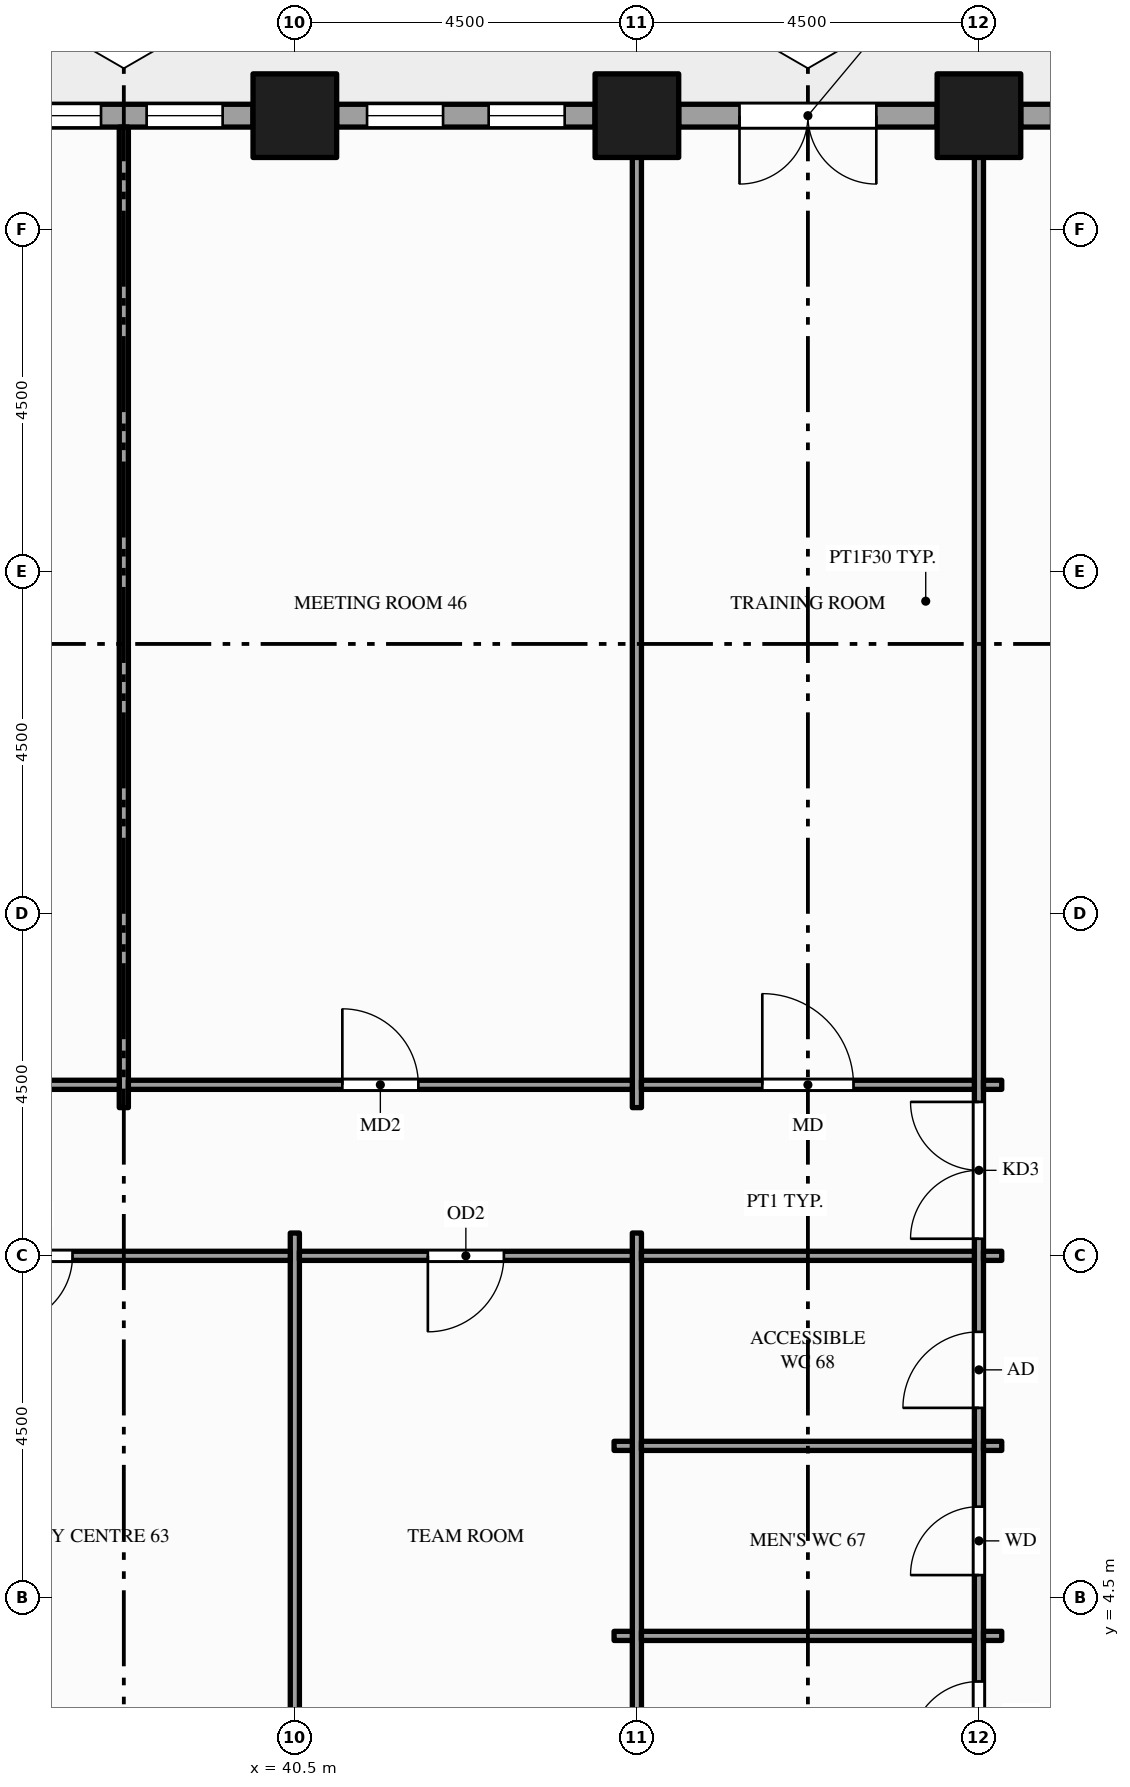
"""IFC4 building model, lengths in metres.
Left out: names, types, materials, properties, quantities, classifications, styles, units other than length and angle.
Written with IfcOpenShell. Run it as: python <this file> out.ifc"""

import sys

from ifc_helpers import new_model, si_unit, direction, frame, frame_2d, origin, origin_2d, place, context, subcontext, project, spatial, rectangle, hollow_rectangle, extrude, element, fill, save


model = new_model("IFC4")
c1 = context("Model", 3, precision=1e-05, world=origin(), true_north=direction((0.0, 1.0)))
c2 = subcontext(c1, "Body", "Model", "MODEL_VIEW")
j1 = project(units=[si_unit("LENGTHUNIT", "METRE"), si_unit("PLANEANGLEUNIT", "RADIAN")], contexts=[c1])
p1 = place(None, origin())
s1 = spatial("IfcSite", under=j1, at=p1, CompositionType="ELEMENT")
p2 = place(p1, origin())
s2 = spatial("IfcBuilding", under=s1, at=p2, CompositionType="ELEMENT")
p3 = place(p2, frame((0.0, 0.0, 29.0)))
s3 = spatial("IfcBuildingStorey", under=s2, at=p3, CompositionType="ELEMENT", Elevation=29.0)
for number, where, z_axis, x_axis in (
    (1, (40.5, 24.0, -0.3), (0.0, 0.0, 1.0), (1.0, 0.0, 0.0)),
    (2, (45.0, 24.0, -0.3), (0.0, 0.0, 1.0), (1.0, 0.0, 0.0)),
    (3, (49.5, 24.0, -0.3), (0.0, 0.0, 1.0), (1.0, 0.0, 0.0)),
):
    element("IfcColumn", number, at=place(p3, frame(where, z_axis=z_axis, x_axis=x_axis)), inside=s3, PredefinedType="COLUMN", context=c2, shape_type="SweptSolid", body=[
        extrude(hollow_rectangle(XDim=1.1, YDim=1.1, WallThickness=0.06, at=origin_2d()), origin(), (0.0, 0.0, 1.0), 4.15),
    ])
p4 = place(p3, frame((53.45, 24.0, 0.0), z_axis=(0.0, 0.0, 1.0), x_axis=(-1.0, 0.0, 0.0)))
e4 = element("IfcWall", 4, at=p4, inside=s3, PredefinedType="STANDARD", context=c2, shape_type="SweptSolid", body=[
    extrude(rectangle(XDim=3.4, YDim=0.3, at=frame_2d((1.7, 0.0))), origin(), (0.0, 0.0, 1.0), 3.144),
])
p5 = place(p4, frame((0.4, 0.0, 0.9)))
e5 = element("IfcOpeningElement", 5, at=p5, cuts=e4, PredefinedType="OPENING", context=c2, shape_type="SweptSolid", body=[
    extrude(rectangle(XDim=1.0, YDim=2.0, at=frame_2d((0.5, 1.0))), frame((0.0, 0.16, 0.0), z_axis=(0.0, -1.0, 0.0), x_axis=(1.0, 0.0, 0.0)), (0.0, 0.0, 1.0), 0.32),
])
p6 = place(p4, frame((2.0, 0.0, 0.9)))
e6 = element("IfcOpeningElement", 6, at=p6, cuts=e4, PredefinedType="OPENING", context=c2, shape_type="SweptSolid", body=[
    extrude(rectangle(XDim=1.0, YDim=2.0, at=frame_2d((0.5, 1.0))), frame((0.0, 0.16, 0.0), z_axis=(0.0, -1.0, 0.0), x_axis=(1.0, 0.0, 0.0)), (0.0, 0.0, 1.0), 0.32),
])
p7 = place(p3, frame((48.95, 24.0, 0.0), z_axis=(0.0, 0.0, 1.0), x_axis=(-1.0, 0.0, 0.0)))
e7 = element("IfcWall", 7, at=p7, inside=s3, PredefinedType="STANDARD", context=c2, shape_type="SweptSolid", body=[
    extrude(rectangle(XDim=3.4, YDim=0.3, at=frame_2d((1.7, 0.0))), origin(), (0.0, 0.0, 1.0), 3.144),
])
p8 = place(p7, frame((0.8, 0.0, 0.0)))
e8 = element("IfcOpeningElement", 8, at=p8, cuts=e7, PredefinedType="OPENING", context=c2, shape_type="SweptSolid", body=[
    extrude(rectangle(XDim=1.8, YDim=2.4, at=frame_2d((0.9, 1.2))), frame((0.0, 0.16, 0.0), z_axis=(0.0, -1.0, 0.0), x_axis=(1.0, 0.0, 0.0)), (0.0, 0.0, 1.0), 0.32),
])
p9 = place(p3, frame((44.45, 24.0, 0.0), z_axis=(0.0, 0.0, 1.0), x_axis=(-1.0, 0.0, 0.0)))
e9 = element("IfcWall", 9, at=p9, inside=s3, PredefinedType="STANDARD", context=c2, shape_type="SweptSolid", body=[
    extrude(rectangle(XDim=3.4, YDim=0.3, at=frame_2d((1.7, 0.0))), origin(), (0.0, 0.0, 1.0), 3.144),
])
p10 = place(p9, frame((0.4, 0.0, 0.9)))
e10 = element("IfcOpeningElement", 10, at=p10, cuts=e9, PredefinedType="OPENING", context=c2, shape_type="SweptSolid", body=[
    extrude(rectangle(XDim=1.0, YDim=2.0, at=frame_2d((0.5, 1.0))), frame((0.0, 0.16, 0.0), z_axis=(0.0, -1.0, 0.0), x_axis=(1.0, 0.0, 0.0)), (0.0, 0.0, 1.0), 0.32),
])
p11 = place(p9, frame((2.0, 0.0, 0.9)))
e11 = element("IfcOpeningElement", 11, at=p11, cuts=e9, PredefinedType="OPENING", context=c2, shape_type="SweptSolid", body=[
    extrude(rectangle(XDim=1.0, YDim=2.0, at=frame_2d((0.5, 1.0))), frame((0.0, 0.16, 0.0), z_axis=(0.0, -1.0, 0.0), x_axis=(1.0, 0.0, 0.0)), (0.0, 0.0, 1.0), 0.32),
])
p12 = place(p3, frame((39.95, 24.0, 0.0), z_axis=(0.0, 0.0, 1.0), x_axis=(-1.0, 0.0, 0.0)))
e12 = element("IfcWall", 12, at=p12, inside=s3, PredefinedType="STANDARD", context=c2, shape_type="SweptSolid", body=[
    extrude(rectangle(XDim=3.4, YDim=0.3, at=frame_2d((1.7, 0.0))), origin(), (0.0, 0.0, 1.0), 3.144),
])
p13 = place(p12, frame((0.4, 0.0, 0.9)))
e13 = element("IfcOpeningElement", 13, at=p13, cuts=e12, PredefinedType="OPENING", context=c2, shape_type="SweptSolid", body=[
    extrude(rectangle(XDim=1.0, YDim=2.0, at=frame_2d((0.5, 1.0))), frame((0.0, 0.16, 0.0), z_axis=(0.0, -1.0, 0.0), x_axis=(1.0, 0.0, 0.0)), (0.0, 0.0, 1.0), 0.32),
])
p14 = place(p12, frame((2.0, 0.0, 0.9)))
e14 = element("IfcOpeningElement", 14, at=p14, cuts=e12, PredefinedType="OPENING", context=c2, shape_type="SweptSolid", body=[
    extrude(rectangle(XDim=1.0, YDim=2.0, at=frame_2d((0.5, 1.0))), frame((0.0, 0.16, 0.0), z_axis=(0.0, -1.0, 0.0), x_axis=(1.0, 0.0, 0.0)), (0.0, 0.0, 1.0), 0.32),
])
p15 = place(p3, frame((38.25, 10.95, 0.0), z_axis=(0.0, 0.0, 1.0), x_axis=(0.0, 1.0, 0.0)))
e15 = element("IfcWall", 15, at=p15, inside=s3, PredefinedType="PARTITIONING", context=c2, shape_type="SweptSolid", body=[
    extrude(rectangle(XDim=12.9, YDim=0.12, at=frame_2d((6.45, 0.0))), origin(), (0.0, 0.0, 1.0), 2.938),
])
for number, where, z_axis, x_axis in (
    (16, (40.5, 1.65, 0.0), (0.0, 0.0, 1.0), (0.0, 1.0, 0.0)),
    (17, (45.0, 1.65, 0.0), (0.0, 0.0, 1.0), (0.0, 1.0, 0.0)),
):
    element("IfcWall", number, at=place(p3, frame(where, z_axis=z_axis, x_axis=x_axis)), inside=s3, PredefinedType="PARTITIONING", context=c2, shape_type="SweptSolid", body=[
        extrude(rectangle(XDim=7.65, YDim=0.12, at=frame_2d((3.825, 0.0))), origin(), (0.0, 0.0, 1.0), 2.938),
    ])
p16 = place(p3, frame((45.0, 10.95, 0.0), z_axis=(0.0, 0.0, 1.0), x_axis=(0.0, 1.0, 0.0)))
e18 = element("IfcWall", 18, at=p16, inside=s3, PredefinedType="PARTITIONING", context=c2, shape_type="SweptSolid", body=[
    extrude(rectangle(XDim=12.9, YDim=0.12, at=frame_2d((6.45, 0.0))), origin(), (0.0, 0.0, 1.0), 2.938),
])
p17 = place(p3, frame((49.5, 1.65, 0.0), z_axis=(0.0, 0.0, 1.0), x_axis=(0.0, 1.0, 0.0)))
e19 = element("IfcWall", 19, at=p17, inside=s3, PredefinedType="PARTITIONING", context=c2, shape_type="SweptSolid", body=[
    extrude(rectangle(XDim=22.2, YDim=0.12, at=frame_2d((11.1, 0.0))), origin(), (0.0, 0.0, 1.0), 2.938),
])
p18 = place(p17, frame((7.575, 0.0, 0.0)))
e20 = element("IfcOpeningElement", 20, at=p18, cuts=e19, PredefinedType="OPENING", context=c2, shape_type="SweptSolid", body=[
    extrude(rectangle(XDim=1.8, YDim=2.1, at=frame_2d((0.9, 1.05))), frame((0.0, 0.07, 0.0), z_axis=(0.0, -1.0, 0.0), x_axis=(1.0, 0.0, 0.0)), (0.0, 0.0, 1.0), 0.14),
])
p19 = place(p17, frame((0.85, 0.0, 0.0)))
e21 = element("IfcOpeningElement", 21, at=p19, cuts=e19, PredefinedType="OPENING", context=c2, shape_type="SweptSolid", body=[
    extrude(rectangle(XDim=0.9, YDim=2.1, at=frame_2d((0.45, 1.05))), frame((0.0, 0.07, 0.0), z_axis=(0.0, -1.0, 0.0), x_axis=(1.0, 0.0, 0.0)), (0.0, 0.0, 1.0), 0.14),
])
p20 = place(p17, frame((3.15, 0.0, 0.0)))
e22 = element("IfcOpeningElement", 22, at=p20, cuts=e19, PredefinedType="OPENING", context=c2, shape_type="SweptSolid", body=[
    extrude(rectangle(XDim=0.9, YDim=2.1, at=frame_2d((0.45, 1.05))), frame((0.0, 0.07, 0.0), z_axis=(0.0, -1.0, 0.0), x_axis=(1.0, 0.0, 0.0)), (0.0, 0.0, 1.0), 0.14),
])
p21 = place(p17, frame((5.35, 0.0, 0.0)))
e23 = element("IfcOpeningElement", 23, at=p21, cuts=e19, PredefinedType="OPENING", context=c2, shape_type="SweptSolid", body=[
    extrude(rectangle(XDim=1.0, YDim=2.1, at=frame_2d((0.5, 1.05))), frame((0.0, 0.07, 0.0), z_axis=(0.0, -1.0, 0.0), x_axis=(1.0, 0.0, 0.0)), (0.0, 0.0, 1.0), 0.14),
])
p22 = place(p3, frame((44.7, 4.0, 0.0), z_axis=(0.0, 0.0, 1.0), x_axis=(1.0, 0.0, 0.0)))
e24 = element("IfcWall", 24, at=p22, inside=s3, PredefinedType="PARTITIONING", context=c2, shape_type="SweptSolid", body=[
    extrude(rectangle(XDim=0.24, YDim=0.12, at=frame_2d((0.12, 0.0))), origin(), (0.0, 0.0, 1.0), 2.938),
])
p23 = place(p3, frame((45.06, 4.0, 0.0), z_axis=(0.0, 0.0, 1.0), x_axis=(1.0, 0.0, 0.0)))
e25 = element("IfcWall", 25, at=p23, inside=s3, PredefinedType="PARTITIONING", context=c2, shape_type="SweptSolid", body=[
    extrude(rectangle(XDim=4.38, YDim=0.12, at=frame_2d((2.19, 0.0))), origin(), (0.0, 0.0, 1.0), 2.938),
])
for number, where, z_axis, x_axis in (
    (26, (49.56, 4.0, 0.0), (0.0, 0.0, 1.0), (1.0, 0.0, 0.0)),
    (27, (44.7, 6.5, 0.0), (0.0, 0.0, 1.0), (1.0, 0.0, 0.0)),
):
    element("IfcWall", number, at=place(p3, frame(where, z_axis=z_axis, x_axis=x_axis)), inside=s3, PredefinedType="PARTITIONING", context=c2, shape_type="SweptSolid", body=[
        extrude(rectangle(XDim=0.24, YDim=0.12, at=frame_2d((0.12, 0.0))), origin(), (0.0, 0.0, 1.0), 2.938),
    ])
p24 = place(p3, frame((45.06, 6.5, 0.0), z_axis=(0.0, 0.0, 1.0), x_axis=(1.0, 0.0, 0.0)))
e28 = element("IfcWall", 28, at=p24, inside=s3, PredefinedType="PARTITIONING", context=c2, shape_type="SweptSolid", body=[
    extrude(rectangle(XDim=4.38, YDim=0.12, at=frame_2d((2.19, 0.0))), origin(), (0.0, 0.0, 1.0), 2.938),
])
p25 = place(p3, frame((49.56, 6.5, 0.0), z_axis=(0.0, 0.0, 1.0), x_axis=(1.0, 0.0, 0.0)))
e29 = element("IfcWall", 29, at=p25, inside=s3, PredefinedType="PARTITIONING", context=c2, shape_type="SweptSolid", body=[
    extrude(rectangle(XDim=0.24, YDim=0.12, at=frame_2d((0.12, 0.0))), origin(), (0.0, 0.0, 1.0), 2.938),
])
p26 = place(p3, frame((33.81, 9.0, 0.0), z_axis=(0.0, 0.0, 1.0), x_axis=(1.0, 0.0, 0.0)))
e30 = element("IfcWall", 30, at=p26, inside=s3, PredefinedType="PARTITIONING", context=c2, shape_type="SweptSolid", body=[
    extrude(rectangle(XDim=6.63, YDim=0.12, at=frame_2d((3.315, 0.0))), origin(), (0.0, 0.0, 1.0), 2.938),
])
p27 = place(p26, frame((2.865, 0.0, 0.0)))
e31 = element("IfcOpeningElement", 31, at=p27, cuts=e30, PredefinedType="OPENING", context=c2, shape_type="SweptSolid", body=[
    extrude(rectangle(XDim=0.9, YDim=2.1, at=frame_2d((0.45, 1.05))), frame((0.0, 0.07, 0.0), z_axis=(0.0, -1.0, 0.0), x_axis=(1.0, 0.0, 0.0)), (0.0, 0.0, 1.0), 0.14),
])
p28 = place(p3, frame((40.56, 9.0, 0.0), z_axis=(0.0, 0.0, 1.0), x_axis=(1.0, 0.0, 0.0)))
e32 = element("IfcWall", 32, at=p28, inside=s3, PredefinedType="PARTITIONING", context=c2, shape_type="SweptSolid", body=[
    extrude(rectangle(XDim=4.38, YDim=0.12, at=frame_2d((2.19, 0.0))), origin(), (0.0, 0.0, 1.0), 2.938),
])
p29 = place(p28, frame((1.69, 0.0, 0.0)))
e33 = element("IfcOpeningElement", 33, at=p29, cuts=e32, PredefinedType="OPENING", context=c2, shape_type="SweptSolid", body=[
    extrude(rectangle(XDim=1.0, YDim=2.1, at=frame_2d((0.5, 1.05))), frame((0.0, 0.07, 0.0), z_axis=(0.0, -1.0, 0.0), x_axis=(1.0, 0.0, 0.0)), (0.0, 0.0, 1.0), 0.14),
])
p30 = place(p3, frame((45.06, 9.0, 0.0), z_axis=(0.0, 0.0, 1.0), x_axis=(1.0, 0.0, 0.0)))
e34 = element("IfcWall", 34, at=p30, inside=s3, PredefinedType="PARTITIONING", context=c2, shape_type="SweptSolid", body=[
    extrude(rectangle(XDim=4.38, YDim=0.12, at=frame_2d((2.19, 0.0))), origin(), (0.0, 0.0, 1.0), 2.938),
])
p31 = place(p3, frame((49.56, 9.0, 0.0), z_axis=(0.0, 0.0, 1.0), x_axis=(1.0, 0.0, 0.0)))
e35 = element("IfcWall", 35, at=p31, inside=s3, PredefinedType="PARTITIONING", context=c2, shape_type="SweptSolid", body=[
    extrude(rectangle(XDim=0.24, YDim=0.12, at=frame_2d((0.12, 0.0))), origin(), (0.0, 0.0, 1.0), 2.938),
])
p32 = place(p3, frame((27.06, 11.25, 0.0), z_axis=(0.0, 0.0, 1.0), x_axis=(1.0, 0.0, 0.0)))
e36 = element("IfcWall", 36, at=p32, inside=s3, PredefinedType="PARTITIONING", context=c2, shape_type="SweptSolid", body=[
    extrude(rectangle(XDim=11.13, YDim=0.12, at=frame_2d((5.565, 0.0))), origin(), (0.0, 0.0, 1.0), 2.938),
])
p33 = place(p32, frame((4.665, 0.0, 0.0)))
e37 = element("IfcOpeningElement", 37, at=p33, cuts=e36, PredefinedType="OPENING", context=c2, shape_type="SweptSolid", body=[
    extrude(rectangle(XDim=1.8, YDim=2.1, at=frame_2d((0.9, 1.05))), frame((0.0, 0.07, 0.0), z_axis=(0.0, -1.0, 0.0), x_axis=(1.0, 0.0, 0.0)), (0.0, 0.0, 1.0), 0.14),
])
p34 = place(p3, frame((38.31, 11.25, 0.0), z_axis=(0.0, 0.0, 1.0), x_axis=(1.0, 0.0, 0.0)))
e38 = element("IfcWall", 38, at=p34, inside=s3, PredefinedType="PARTITIONING", context=c2, shape_type="SweptSolid", body=[
    extrude(rectangle(XDim=6.63, YDim=0.12, at=frame_2d((3.315, 0.0))), origin(), (0.0, 0.0, 1.0), 2.938),
])
p35 = place(p34, frame((2.815, 0.0, 0.0)))
e39 = element("IfcOpeningElement", 39, at=p35, cuts=e38, PredefinedType="OPENING", context=c2, shape_type="SweptSolid", body=[
    extrude(rectangle(XDim=1.0, YDim=2.1, at=frame_2d((0.5, 1.05))), frame((0.0, 0.07, 0.0), z_axis=(0.0, -1.0, 0.0), x_axis=(1.0, 0.0, 0.0)), (0.0, 0.0, 1.0), 0.14),
])
p36 = place(p3, frame((45.06, 11.25, 0.0), z_axis=(0.0, 0.0, 1.0), x_axis=(1.0, 0.0, 0.0)))
e40 = element("IfcWall", 40, at=p36, inside=s3, PredefinedType="PARTITIONING", context=c2, shape_type="SweptSolid", body=[
    extrude(rectangle(XDim=4.38, YDim=0.12, at=frame_2d((2.19, 0.0))), origin(), (0.0, 0.0, 1.0), 2.938),
])
p37 = place(p36, frame((1.59, 0.0, 0.0)))
e41 = element("IfcOpeningElement", 41, at=p37, cuts=e40, PredefinedType="OPENING", context=c2, shape_type="SweptSolid", body=[
    extrude(rectangle(XDim=1.2, YDim=2.1, at=frame_2d((0.6, 1.05))), frame((0.0, 0.07, 0.0), z_axis=(0.0, -1.0, 0.0), x_axis=(1.0, 0.0, 0.0)), (0.0, 0.0, 1.0), 0.14),
])
p38 = place(p3, frame((49.56, 11.25, 0.0), z_axis=(0.0, 0.0, 1.0), x_axis=(1.0, 0.0, 0.0)))
e42 = element("IfcWall", 42, at=p38, inside=s3, PredefinedType="PARTITIONING", context=c2, shape_type="SweptSolid", body=[
    extrude(rectangle(XDim=0.24, YDim=0.12, at=frame_2d((0.12, 0.0))), origin(), (0.0, 0.0, 1.0), 2.938),
])
p39 = place(p8, origin())
e43 = element("IfcDoor", 43, at=p39, inside=s3, OperationType="DOUBLE_DOOR_SINGLE_SWING", PredefinedType="DOOR", context=c2, shape_type="SweptSolid", body=[
    extrude(rectangle(XDim=1.8, YDim=2.4, at=frame_2d((0.9, 1.2))), frame((0.0, 0.025, 0.0), z_axis=(0.0, -1.0, 0.0), x_axis=(1.0, 0.0, 0.0)), (0.0, 0.0, 1.0), 0.05),
])
fill(e8, e43)
p40 = place(p10, origin())
e44 = element("IfcWindow", 44, at=p40, inside=s3, PartitioningType="SINGLE_PANEL", PredefinedType="WINDOW", context=c2, shape_type="SweptSolid", body=[
    extrude(rectangle(XDim=1.0, YDim=2.0, at=frame_2d((0.5, 1.0))), frame((0.0, 0.03, 0.0), z_axis=(0.0, -1.0, 0.0), x_axis=(1.0, 0.0, 0.0)), (0.0, 0.0, 1.0), 0.06),
])
fill(e10, e44)
p41 = place(p11, origin())
e45 = element("IfcWindow", 45, at=p41, inside=s3, PartitioningType="SINGLE_PANEL", PredefinedType="WINDOW", context=c2, shape_type="SweptSolid", body=[
    extrude(rectangle(XDim=1.0, YDim=2.0, at=frame_2d((0.5, 1.0))), frame((0.0, 0.03, 0.0), z_axis=(0.0, -1.0, 0.0), x_axis=(1.0, 0.0, 0.0)), (0.0, 0.0, 1.0), 0.06),
])
fill(e11, e45)
p42 = place(p13, origin())
e46 = element("IfcWindow", 46, at=p42, inside=s3, PartitioningType="SINGLE_PANEL", PredefinedType="WINDOW", context=c2, shape_type="SweptSolid", body=[
    extrude(rectangle(XDim=1.0, YDim=2.0, at=frame_2d((0.5, 1.0))), frame((0.0, 0.03, 0.0), z_axis=(0.0, -1.0, 0.0), x_axis=(1.0, 0.0, 0.0)), (0.0, 0.0, 1.0), 0.06),
])
fill(e13, e46)
p43 = place(p14, origin())
e47 = element("IfcWindow", 47, at=p43, inside=s3, PartitioningType="SINGLE_PANEL", PredefinedType="WINDOW", context=c2, shape_type="SweptSolid", body=[
    extrude(rectangle(XDim=1.0, YDim=2.0, at=frame_2d((0.5, 1.0))), frame((0.0, 0.03, 0.0), z_axis=(0.0, -1.0, 0.0), x_axis=(1.0, 0.0, 0.0)), (0.0, 0.0, 1.0), 0.06),
])
fill(e14, e47)
p44 = place(p18, origin())
e48 = element("IfcDoor", 48, at=p44, inside=s3, OperationType="DOUBLE_DOOR_SINGLE_SWING", PredefinedType="DOOR", context=c2, shape_type="SweptSolid", body=[
    extrude(rectangle(XDim=1.8, YDim=2.1, at=frame_2d((0.9, 1.05))), frame((0.0, 0.025, 0.0), z_axis=(0.0, -1.0, 0.0), x_axis=(1.0, 0.0, 0.0)), (0.0, 0.0, 1.0), 0.05),
])
fill(e20, e48)
p45 = place(p27, origin())
e49 = element("IfcDoor", 49, at=p45, inside=s3, OperationType="SINGLE_SWING_LEFT", PredefinedType="DOOR", context=c2, shape_type="SweptSolid", body=[
    extrude(rectangle(XDim=0.9, YDim=2.1, at=frame_2d((0.45, 1.05))), frame((0.0, 0.025, 0.0), z_axis=(0.0, -1.0, 0.0), x_axis=(1.0, 0.0, 0.0)), (0.0, 0.0, 1.0), 0.05),
])
fill(e31, e49)
p46 = place(p29, origin())
e50 = element("IfcDoor", 50, at=p46, inside=s3, OperationType="SINGLE_SWING_LEFT", PredefinedType="DOOR", context=c2, shape_type="SweptSolid", body=[
    extrude(rectangle(XDim=1.0, YDim=2.1, at=frame_2d((0.5, 1.05))), frame((0.0, 0.025, 0.0), z_axis=(0.0, -1.0, 0.0), x_axis=(1.0, 0.0, 0.0)), (0.0, 0.0, 1.0), 0.05),
])
fill(e33, e50)
p47 = place(p19, origin())
e51 = element("IfcDoor", 51, at=p47, inside=s3, OperationType="SINGLE_SWING_LEFT", PredefinedType="DOOR", context=c2, shape_type="SweptSolid", body=[
    extrude(rectangle(XDim=0.9, YDim=2.1, at=frame_2d((0.45, 1.05))), frame((0.0, 0.025, 0.0), z_axis=(0.0, -1.0, 0.0), x_axis=(1.0, 0.0, 0.0)), (0.0, 0.0, 1.0), 0.05),
])
fill(e21, e51)
p48 = place(p20, origin())
e52 = element("IfcDoor", 52, at=p48, inside=s3, OperationType="SINGLE_SWING_LEFT", PredefinedType="DOOR", context=c2, shape_type="SweptSolid", body=[
    extrude(rectangle(XDim=0.9, YDim=2.1, at=frame_2d((0.45, 1.05))), frame((0.0, 0.025, 0.0), z_axis=(0.0, -1.0, 0.0), x_axis=(1.0, 0.0, 0.0)), (0.0, 0.0, 1.0), 0.05),
])
fill(e22, e52)
p49 = place(p21, origin())
e53 = element("IfcDoor", 53, at=p49, inside=s3, OperationType="SINGLE_SWING_LEFT", PredefinedType="DOOR", context=c2, shape_type="SweptSolid", body=[
    extrude(rectangle(XDim=1.0, YDim=2.1, at=frame_2d((0.5, 1.05))), frame((0.0, 0.025, 0.0), z_axis=(0.0, -1.0, 0.0), x_axis=(1.0, 0.0, 0.0)), (0.0, 0.0, 1.0), 0.05),
])
fill(e23, e53)
p50 = place(p35, origin())
e54 = element("IfcDoor", 54, at=p50, inside=s3, OperationType="SINGLE_SWING_LEFT", PredefinedType="DOOR", context=c2, shape_type="SweptSolid", body=[
    extrude(rectangle(XDim=1.0, YDim=2.1, at=frame_2d((0.5, 1.05))), frame((0.0, 0.025, 0.0), z_axis=(0.0, -1.0, 0.0), x_axis=(1.0, 0.0, 0.0)), (0.0, 0.0, 1.0), 0.05),
])
fill(e39, e54)
p51 = place(p37, origin())
e55 = element("IfcDoor", 55, at=p51, inside=s3, OperationType="SINGLE_SWING_LEFT", PredefinedType="DOOR", context=c2, shape_type="SweptSolid", body=[
    extrude(rectangle(XDim=1.2, YDim=2.1, at=frame_2d((0.6, 1.05))), frame((0.0, 0.025, 0.0), z_axis=(0.0, -1.0, 0.0), x_axis=(1.0, 0.0, 0.0)), (0.0, 0.0, 1.0), 0.05),
])
fill(e41, e55)
save(model, sys.argv[1])
